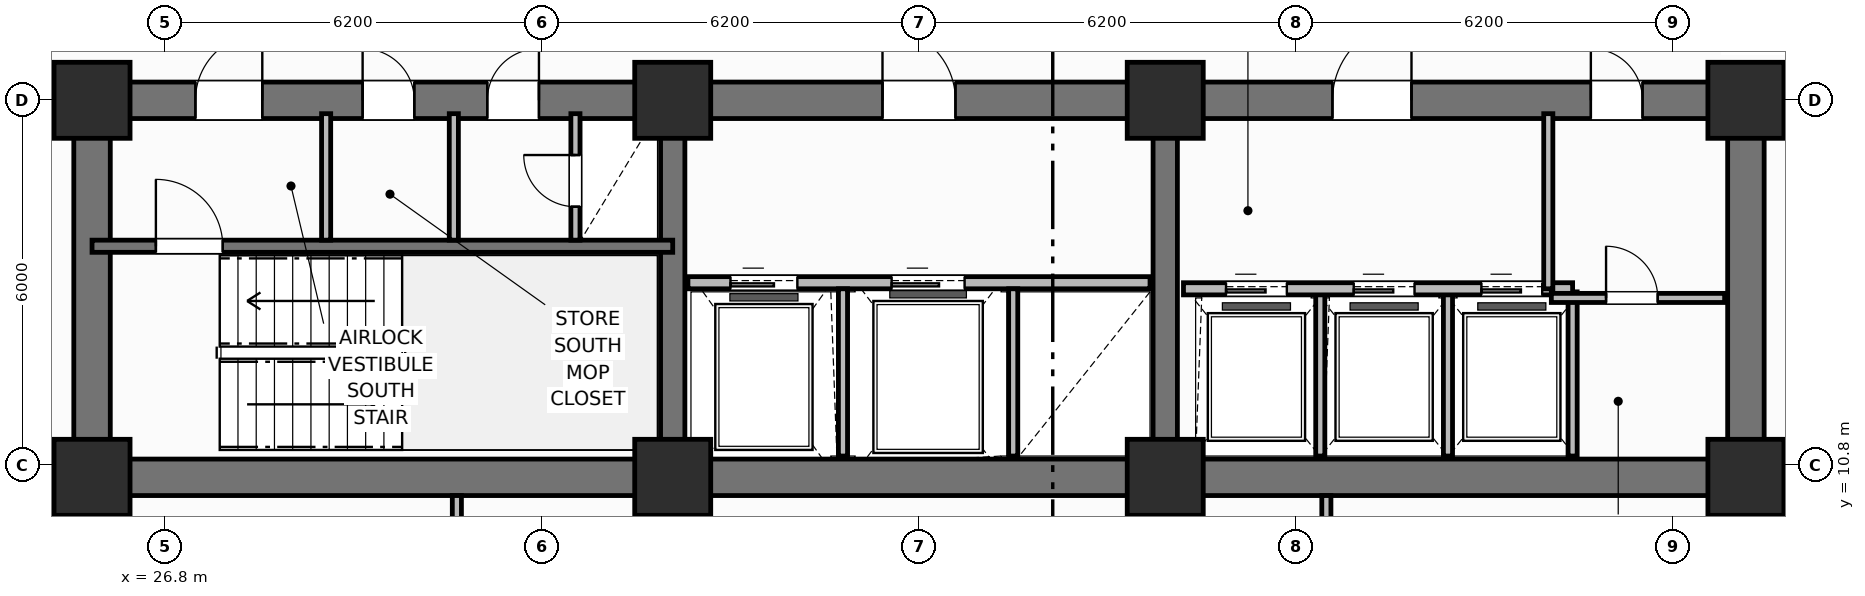
"""IFC4 building model, lengths in metres.
Left out: names, types, materials, properties, quantities, classifications, styles, units other than length and angle.
Written with IfcOpenShell. Run it as: python <this file> out.ifc"""

import sys

from ifc_helpers import new_model, si_unit, direction, frame, frame_2d, origin, origin_2d, place, context, subcontext, project, spatial, rectangle, extrude, element, fill, save


model = new_model("IFC4")
c1 = context("Model", 3, precision=1e-05, world=origin(), true_north=direction((0.0, 1.0)))
c2 = subcontext(c1, "Body", "Model", "MODEL_VIEW")
j1 = project(units=[si_unit("LENGTHUNIT", "METRE"), si_unit("PLANEANGLEUNIT", "RADIAN")], contexts=[c1])
p1 = place(None, origin())
s1 = spatial("IfcSite", under=j1, at=p1, CompositionType="ELEMENT")
p2 = place(p1, origin())
s2 = spatial("IfcBuilding", under=s1, at=p2, CompositionType="ELEMENT")
p3 = place(p2, frame((0.0, 0.0, 73.2)))
s3 = spatial("IfcBuildingStorey", under=s2, at=p3, CompositionType="ELEMENT", Elevation=73.2)
p4 = place(p3, frame((52.8, 10.6, 0.0), z_axis=(0.0, 0.0, 1.0), x_axis=(-1.0, 0.0, 0.0)))
e1 = element("IfcWall", 1, at=p4, inside=s3, PredefinedType="SHEAR", context=c2, shape_type="SweptSolid", body=[
    extrude(rectangle(XDim=27.2, YDim=0.6, at=frame_2d((13.6, 0.0))), origin(), (0.0, 0.0, 1.0), 3.7),
])
for number, where, z_axis, x_axis in (
    (2, (25.6, 10.9, 0.0), (0.0, 0.0, 1.0), (0.0, 1.0, 0.0)),
    (3, (52.8, 10.9, 0.0), (0.0, 0.0, 1.0), (0.0, 1.0, 0.0)),
):
    element("IfcWall", number, at=place(p3, frame(where, z_axis=z_axis, x_axis=x_axis)), inside=s3, PredefinedType="SHEAR", context=c2, shape_type="SweptSolid", body=[
        extrude(rectangle(XDim=5.6, YDim=0.6, at=frame_2d((2.8, 0.0))), origin(), (0.0, 0.0, 1.0), 3.7),
    ])
p5 = place(p3, frame((25.6, 16.8, 0.0), z_axis=(0.0, 0.0, 1.0), x_axis=(1.0, 0.0, 0.0)))
e4 = element("IfcWall", 4, at=p5, inside=s3, PredefinedType="SHEAR", context=c2, shape_type="SweptSolid", body=[
    extrude(rectangle(XDim=27.2, YDim=0.6, at=frame_2d((13.6, 0.0))), origin(), (0.0, 0.0, 1.0), 3.7),
])
p6 = place(p5, frame((1.7, 0.0, 0.0)))
e5 = element("IfcOpeningElement", 5, at=p6, cuts=e4, PredefinedType="OPENING", context=c2, shape_type="SweptSolid", body=[
    extrude(rectangle(XDim=1.1, YDim=2.15, at=frame_2d((0.55, 1.075))), frame((0.0, 0.31, 0.0), z_axis=(0.0, -1.0, 0.0), x_axis=(1.0, 0.0, 0.0)), (0.0, 0.0, 1.0), 0.62),
])
p7 = place(p5, frame((4.45, 0.0, 0.0)))
e6 = element("IfcOpeningElement", 6, at=p7, cuts=e4, PredefinedType="OPENING", context=c2, shape_type="SweptSolid", body=[
    extrude(rectangle(XDim=0.85, YDim=2.1, at=frame_2d((0.425, 1.05))), frame((0.0, 0.31, 0.0), z_axis=(0.0, -1.0, 0.0), x_axis=(1.0, 0.0, 0.0)), (0.0, 0.0, 1.0), 0.62),
])
p8 = place(p5, frame((6.5, 0.0, 0.0)))
e7 = element("IfcOpeningElement", 7, at=p8, cuts=e4, PredefinedType="OPENING", context=c2, shape_type="SweptSolid", body=[
    extrude(rectangle(XDim=0.85, YDim=2.1, at=frame_2d((0.425, 1.05))), frame((0.0, 0.31, 0.0), z_axis=(0.0, -1.0, 0.0), x_axis=(1.0, 0.0, 0.0)), (0.0, 0.0, 1.0), 0.62),
])
p9 = place(p5, frame((13.0, 0.0, 0.0)))
e8 = element("IfcOpeningElement", 8, at=p9, cuts=e4, PredefinedType="OPENING", context=c2, shape_type="SweptSolid", body=[
    extrude(rectangle(XDim=1.2, YDim=2.15, at=frame_2d((0.6, 1.075))), frame((0.0, 0.31, 0.0), z_axis=(0.0, -1.0, 0.0), x_axis=(1.0, 0.0, 0.0)), (0.0, 0.0, 1.0), 0.62),
])
p10 = place(p5, frame((20.4, 0.0, 0.0)))
e9 = element("IfcOpeningElement", 9, at=p10, cuts=e4, PredefinedType="OPENING", context=c2, shape_type="SweptSolid", body=[
    extrude(rectangle(XDim=1.3, YDim=2.2, at=frame_2d((0.65, 1.1))), frame((0.0, 0.31, 0.0), z_axis=(0.0, -1.0, 0.0), x_axis=(1.0, 0.0, 0.0)), (0.0, 0.0, 1.0), 0.62),
])
p11 = place(p5, frame((24.65, 0.0, 0.0)))
e10 = element("IfcOpeningElement", 10, at=p11, cuts=e4, PredefinedType="OPENING", context=c2, shape_type="SweptSolid", body=[
    extrude(rectangle(XDim=0.85, YDim=2.1, at=frame_2d((0.425, 1.05))), frame((0.0, 0.31, 0.0), z_axis=(0.0, -1.0, 0.0), x_axis=(1.0, 0.0, 0.0)), (0.0, 0.0, 1.0), 0.62),
])
for number, where, z_axis, x_axis in (
    (11, (35.15, 10.9, 0.0), (0.0, 0.0, 1.0), (0.0, 1.0, 0.0)),
    (12, (43.25, 10.9, 0.0), (0.0, 0.0, 1.0), (0.0, 1.0, 0.0)),
):
    element("IfcWall", number, at=place(p3, frame(where, z_axis=z_axis, x_axis=x_axis)), inside=s3, PredefinedType="SHEAR", context=c2, shape_type="SweptSolid", body=[
        extrude(rectangle(XDim=5.6, YDim=0.4, at=frame_2d((2.8, 0.0))), origin(), (0.0, 0.0, 1.0), 3.7),
    ])
for number, where, z_axis, x_axis in (
    (13, (25.6, 10.6, 0.0), (0.0, 0.0, 1.0), (1.0, 0.0, 0.0)),
    (14, (25.6, 16.8, 0.0), (0.0, 0.0, 1.0), (1.0, 0.0, 0.0)),
    (15, (35.15, 10.6, 0.0), (0.0, 0.0, 1.0), (1.0, 0.0, 0.0)),
    (16, (35.15, 16.8, 0.0), (0.0, 0.0, 1.0), (1.0, 0.0, 0.0)),
    (17, (43.25, 10.6, 0.0), (0.0, 0.0, 1.0), (1.0, 0.0, 0.0)),
    (18, (43.25, 16.8, 0.0), (0.0, 0.0, 1.0), (1.0, 0.0, 0.0)),
    (19, (52.8, 10.6, 0.0), (0.0, 0.0, 1.0), (1.0, 0.0, 0.0)),
    (20, (52.8, 16.8, 0.0), (0.0, 0.0, 1.0), (1.0, 0.0, 0.0)),
):
    element("IfcColumn", number, at=place(p3, frame(where, z_axis=z_axis, x_axis=x_axis)), inside=s3, PredefinedType="COLUMN", context=c2, shape_type="SweptSolid", body=[
        extrude(rectangle(XDim=1.25, YDim=1.25, at=origin_2d()), origin(), (0.0, 0.0, 1.0), 3.7),
    ])
p12 = place(p3, frame((25.6, 14.4, 0.0), z_axis=(0.0, 0.0, 1.0), x_axis=(1.0, 0.0, 0.0)))
e21 = element("IfcWall", 21, at=p12, inside=s3, PredefinedType="SHEAR", context=c2, shape_type="SweptSolid", body=[
    extrude(rectangle(XDim=9.55, YDim=0.2, at=frame_2d((4.775, 0.0))), origin(), (0.0, 0.0, 1.0), 3.7),
])
p13 = place(p12, frame((1.05, 0.0, 0.0)))
e22 = element("IfcOpeningElement", 22, at=p13, cuts=e21, PredefinedType="OPENING", context=c2, shape_type="SweptSolid", body=[
    extrude(rectangle(XDim=1.1, YDim=2.15, at=frame_2d((0.55, 1.075))), frame((0.0, 0.11, 0.0), z_axis=(0.0, -1.0, 0.0), x_axis=(1.0, 0.0, 0.0)), (0.0, 0.0, 1.0), 0.22),
])
for number, where, z_axis, x_axis in (
    (23, (29.45, 14.5, 0.0), (0.0, 0.0, 1.0), (0.0, 1.0, 0.0)),
    (24, (31.55, 14.5, 0.0), (0.0, 0.0, 1.0), (0.0, 1.0, 0.0)),
):
    element("IfcWall", number, at=place(p3, frame(where, z_axis=z_axis, x_axis=x_axis)), inside=s3, PredefinedType="PARTITIONING", context=c2, shape_type="SweptSolid", body=[
        extrude(rectangle(XDim=2.08, YDim=0.15, at=frame_2d((1.04, 0.0))), origin(), (0.0, 0.0, 1.0), 2.49),
    ])
p14 = place(p3, frame((33.55, 14.5, 0.0), z_axis=(0.0, 0.0, 1.0), x_axis=(0.0, 1.0, 0.0)))
e25 = element("IfcWall", 25, at=p14, inside=s3, PredefinedType="PARTITIONING", context=c2, shape_type="SweptSolid", body=[
    extrude(rectangle(XDim=2.08, YDim=0.15, at=frame_2d((1.04, 0.0))), origin(), (0.0, 0.0, 1.0), 2.49),
])
p15 = place(p14, frame((0.55, 0.0, 0.0)))
e26 = element("IfcOpeningElement", 26, at=p15, cuts=e25, PredefinedType="OPENING", context=c2, shape_type="SweptSolid", body=[
    extrude(rectangle(XDim=0.85, YDim=2.05, at=frame_2d((0.425, 1.025))), frame((0.0, 0.085, 0.0), z_axis=(0.0, -1.0, 0.0), x_axis=(1.0, 0.0, 0.0)), (0.0, 0.0, 1.0), 0.17),
])
p16 = place(p3, frame((35.4, 13.8, 0.0), z_axis=(0.0, 0.0, 1.0), x_axis=(1.0, 0.0, 0.0)))
e27 = element("IfcWall", 27, at=p16, inside=s3, PredefinedType="PARTITIONING", context=c2, shape_type="SweptSolid", body=[
    extrude(rectangle(XDim=7.6, YDim=0.2, at=frame_2d((3.8, 0.0))), origin(), (0.0, 0.0, 1.0), 2.26),
])
p17 = place(p16, frame((0.7, 0.0, 0.0)))
e28 = element("IfcOpeningElement", 28, at=p17, cuts=e27, PredefinedType="OPENING", context=c2, shape_type="SweptSolid", body=[
    extrude(rectangle(XDim=1.1, YDim=2.15, at=frame_2d((0.55, 1.075))), frame((0.0, 0.11, 0.0), z_axis=(0.0, -1.0, 0.0), x_axis=(1.0, 0.0, 0.0)), (0.0, 0.0, 1.0), 0.22),
])
p18 = place(p16, frame((3.35, 0.0, 0.0)))
e29 = element("IfcOpeningElement", 29, at=p18, cuts=e27, PredefinedType="OPENING", context=c2, shape_type="SweptSolid", body=[
    extrude(rectangle(XDim=1.2, YDim=2.15, at=frame_2d((0.6, 1.075))), frame((0.0, 0.11, 0.0), z_axis=(0.0, -1.0, 0.0), x_axis=(1.0, 0.0, 0.0)), (0.0, 0.0, 1.0), 0.22),
])
for number, where, z_axis, x_axis in (
    (30, (37.95, 10.95, 0.0), (0.0, 0.0, 1.0), (0.0, 1.0, 0.0)),
    (31, (40.75, 10.95, 0.0), (0.0, 0.0, 1.0), (0.0, 1.0, 0.0)),
):
    element("IfcWall", number, at=place(p3, frame(where, z_axis=z_axis, x_axis=x_axis)), inside=s3, PredefinedType="PARTITIONING", context=c2, shape_type="SweptSolid", body=[
        extrude(rectangle(XDim=2.75, YDim=0.15, at=frame_2d((1.375, 0.0))), origin(), (0.0, 0.0, 1.0), 2.49),
    ])
for number, where, z_axis, x_axis in (
    (32, (45.8, 10.95, 0.0), (0.0, 0.0, 1.0), (0.0, 1.0, 0.0)),
    (33, (47.9, 10.95, 0.0), (0.0, 0.0, 1.0), (0.0, 1.0, 0.0)),
    (34, (49.95, 10.95, 0.0), (0.0, 0.0, 1.0), (0.0, 1.0, 0.0)),
):
    element("IfcWall", number, at=place(p3, frame(where, z_axis=z_axis, x_axis=x_axis)), inside=s3, PredefinedType="PARTITIONING", context=c2, shape_type="SweptSolid", body=[
        extrude(rectangle(XDim=2.7, YDim=0.15, at=frame_2d((1.35, 0.0))), origin(), (0.0, 0.0, 1.0), 2.49),
    ])
p19 = place(p3, frame((43.55, 13.7, 0.0), z_axis=(0.0, 0.0, 1.0), x_axis=(1.0, 0.0, 0.0)))
e35 = element("IfcWall", 35, at=p19, inside=s3, PredefinedType="PARTITIONING", context=c2, shape_type="SweptSolid", body=[
    extrude(rectangle(XDim=6.4, YDim=0.2, at=frame_2d((3.2, 0.0))), origin(), (0.0, 0.0, 1.0), 2.49),
])
p20 = place(p19, frame((0.7, 0.0, 0.0)))
e36 = element("IfcOpeningElement", 36, at=p20, cuts=e35, PredefinedType="OPENING", context=c2, shape_type="SweptSolid", body=[
    extrude(rectangle(XDim=1.0, YDim=2.15, at=frame_2d((0.5, 1.075))), frame((0.0, 0.11, 0.0), z_axis=(0.0, -1.0, 0.0), x_axis=(1.0, 0.0, 0.0)), (0.0, 0.0, 1.0), 0.22),
])
p21 = place(p19, frame((2.8, 0.0, 0.0)))
e37 = element("IfcOpeningElement", 37, at=p21, cuts=e35, PredefinedType="OPENING", context=c2, shape_type="SweptSolid", body=[
    extrude(rectangle(XDim=1.0, YDim=2.15, at=frame_2d((0.5, 1.075))), frame((0.0, 0.11, 0.0), z_axis=(0.0, -1.0, 0.0), x_axis=(1.0, 0.0, 0.0)), (0.0, 0.0, 1.0), 0.22),
])
p22 = place(p19, frame((4.9, 0.0, 0.0)))
e38 = element("IfcOpeningElement", 38, at=p22, cuts=e35, PredefinedType="OPENING", context=c2, shape_type="SweptSolid", body=[
    extrude(rectangle(XDim=1.0, YDim=2.15, at=frame_2d((0.5, 1.075))), frame((0.0, 0.11, 0.0), z_axis=(0.0, -1.0, 0.0), x_axis=(1.0, 0.0, 0.0)), (0.0, 0.0, 1.0), 0.22),
])
p23 = place(p3, frame((49.55, 13.7, 0.0), z_axis=(0.0, 0.0, 1.0), x_axis=(0.0, 1.0, 0.0)))
e39 = element("IfcWall", 39, at=p23, inside=s3, PredefinedType="PARTITIONING", context=c2, shape_type="SweptSolid", body=[
    extrude(rectangle(XDim=2.88, YDim=0.15, at=frame_2d((1.44, 0.0))), origin(), (0.0, 0.0, 1.0), 2.49),
])
p24 = place(p3, frame((49.6, 13.55, 0.0), z_axis=(0.0, 0.0, 1.0), x_axis=(1.0, 0.0, 0.0)))
e40 = element("IfcWall", 40, at=p24, inside=s3, PredefinedType="PARTITIONING", context=c2, shape_type="SweptSolid", body=[
    extrude(rectangle(XDim=2.85, YDim=0.15, at=frame_2d((1.425, 0.0))), origin(), (0.0, 0.0, 1.0), 2.49),
])
p25 = place(p24, frame((0.9, 0.0, 0.0)))
e41 = element("IfcOpeningElement", 41, at=p25, cuts=e40, PredefinedType="OPENING", context=c2, shape_type="SweptSolid", body=[
    extrude(rectangle(XDim=0.85, YDim=2.1, at=frame_2d((0.425, 1.05))), frame((0.0, 0.085, 0.0), z_axis=(0.0, -1.0, 0.0), x_axis=(1.0, 0.0, 0.0)), (0.0, 0.0, 1.0), 0.17),
])
p26 = place(p3, frame((31.6, 4.97, 0.0), z_axis=(0.0, 0.0, 1.0), x_axis=(0.0, 1.0, 0.0)))
e42 = element("IfcWall", 42, at=p26, inside=s3, PredefinedType="PARTITIONING", context=c2, shape_type="SweptSolid", body=[
    extrude(rectangle(XDim=5.33, YDim=0.15, at=frame_2d((2.665, 0.0))), origin(), (0.0, 0.0, 1.0), 2.49),
])
p27 = place(p26, frame((1.8, 0.0, 0.0)))
e43 = element("IfcOpeningElement", 43, at=p27, cuts=e42, PredefinedType="OPENING", context=c2, shape_type="SweptSolid", body=[
    extrude(rectangle(XDim=0.9, YDim=2.1, at=frame_2d((0.45, 1.05))), frame((0.0, 0.085, 0.0), z_axis=(0.0, -1.0, 0.0), x_axis=(1.0, 0.0, 0.0)), (0.0, 0.0, 1.0), 0.17),
])
p28 = place(p3, frame((45.9, 4.97, 0.0), z_axis=(0.0, 0.0, 1.0), x_axis=(0.0, 1.0, 0.0)))
e44 = element("IfcWall", 44, at=p28, inside=s3, PredefinedType="PARTITIONING", context=c2, shape_type="SweptSolid", body=[
    extrude(rectangle(XDim=5.33, YDim=0.15, at=frame_2d((2.665, 0.0))), origin(), (0.0, 0.0, 1.0), 2.49),
])
p29 = place(p3, frame((25.4, 6.12, 0.0), z_axis=(0.0, 0.0, 1.0), x_axis=(0.0, 1.0, 0.0)))
e45 = element("IfcWall", 45, at=p29, inside=s3, PredefinedType="PARTITIONING", context=c2, shape_type="SweptSolid", body=[
    extrude(rectangle(XDim=4.18, YDim=0.2, at=frame_2d((2.09, 0.0))), origin(), (0.0, 0.0, 1.0), 2.49),
])
p30 = place(p29, frame((0.65, 0.0, 0.0)))
e46 = element("IfcOpeningElement", 46, at=p30, cuts=e45, PredefinedType="OPENING", context=c2, shape_type="SweptSolid", body=[
    extrude(rectangle(XDim=0.9, YDim=2.1, at=frame_2d((0.45, 1.05))), frame((0.0, 0.11, 0.0), z_axis=(0.0, -1.0, 0.0), x_axis=(1.0, 0.0, 0.0)), (0.0, 0.0, 1.0), 0.22),
])
p31 = place(p3, frame((53.0, 6.12, 0.0), z_axis=(0.0, 0.0, 1.0), x_axis=(0.0, 1.0, 0.0)))
e47 = element("IfcWall", 47, at=p31, inside=s3, PredefinedType="PARTITIONING", context=c2, shape_type="SweptSolid", body=[
    extrude(rectangle(XDim=4.18, YDim=0.2, at=frame_2d((2.09, 0.0))), origin(), (0.0, 0.0, 1.0), 2.49),
])
p32 = place(p31, frame((0.65, 0.0, 0.0)))
e48 = element("IfcOpeningElement", 48, at=p32, cuts=e47, PredefinedType="OPENING", context=c2, shape_type="SweptSolid", body=[
    extrude(rectangle(XDim=0.9, YDim=2.1, at=frame_2d((0.45, 1.05))), frame((0.0, 0.11, 0.0), z_axis=(0.0, -1.0, 0.0), x_axis=(1.0, 0.0, 0.0)), (0.0, 0.0, 1.0), 0.22),
])
p33 = place(p13, origin())
e49 = element("IfcDoor", 49, at=p33, inside=s3, OperationType="SINGLE_SWING_LEFT", PredefinedType="DOOR", context=c2, shape_type="SweptSolid", body=[
    extrude(rectangle(XDim=1.1, YDim=2.15, at=frame_2d((0.55, 1.075))), frame((0.0, 0.025, 0.0), z_axis=(0.0, -1.0, 0.0), x_axis=(1.0, 0.0, 0.0)), (0.0, 0.0, 1.0), 0.05),
])
fill(e22, e49)
p34 = place(p15, origin())
e50 = element("IfcDoor", 50, at=p34, inside=s3, OperationType="SINGLE_SWING_RIGHT", PredefinedType="TRAPDOOR", context=c2, shape_type="SweptSolid", body=[
    extrude(rectangle(XDim=0.85, YDim=2.05, at=frame_2d((0.425, 1.025))), frame((0.0, 0.025, 0.0), z_axis=(0.0, -1.0, 0.0), x_axis=(1.0, 0.0, 0.0)), (0.0, 0.0, 1.0), 0.05),
])
fill(e26, e50)
p35 = place(p17, origin())
e51 = element("IfcDoor", 51, at=p35, inside=s3, OperationType="SLIDING_TO_LEFT", PredefinedType="DOOR", context=c2, shape_type="SweptSolid", body=[
    extrude(rectangle(XDim=1.1, YDim=2.15, at=frame_2d((0.55, 1.075))), frame((0.0, 0.025, 0.0), z_axis=(0.0, -1.0, 0.0), x_axis=(1.0, 0.0, 0.0)), (0.0, 0.0, 1.0), 0.05),
])
fill(e28, e51)
p36 = place(p18, origin())
e52 = element("IfcDoor", 52, at=p36, inside=s3, OperationType="SLIDING_TO_LEFT", PredefinedType="DOOR", context=c2, shape_type="SweptSolid", body=[
    extrude(rectangle(XDim=1.2, YDim=2.15, at=frame_2d((0.6, 1.075))), frame((0.0, 0.025, 0.0), z_axis=(0.0, -1.0, 0.0), x_axis=(1.0, 0.0, 0.0)), (0.0, 0.0, 1.0), 0.05),
])
fill(e29, e52)
p37 = place(p20, origin())
e53 = element("IfcDoor", 53, at=p37, inside=s3, OperationType="SLIDING_TO_LEFT", PredefinedType="DOOR", context=c2, shape_type="SweptSolid", body=[
    extrude(rectangle(XDim=1.0, YDim=2.15, at=frame_2d((0.5, 1.075))), frame((0.0, 0.025, 0.0), z_axis=(0.0, -1.0, 0.0), x_axis=(1.0, 0.0, 0.0)), (0.0, 0.0, 1.0), 0.05),
])
fill(e36, e53)
p38 = place(p21, origin())
e54 = element("IfcDoor", 54, at=p38, inside=s3, OperationType="SLIDING_TO_LEFT", PredefinedType="DOOR", context=c2, shape_type="SweptSolid", body=[
    extrude(rectangle(XDim=1.0, YDim=2.15, at=frame_2d((0.5, 1.075))), frame((0.0, 0.025, 0.0), z_axis=(0.0, -1.0, 0.0), x_axis=(1.0, 0.0, 0.0)), (0.0, 0.0, 1.0), 0.05),
])
fill(e37, e54)
p39 = place(p22, origin())
e55 = element("IfcDoor", 55, at=p39, inside=s3, OperationType="SLIDING_TO_LEFT", PredefinedType="DOOR", context=c2, shape_type="SweptSolid", body=[
    extrude(rectangle(XDim=1.0, YDim=2.15, at=frame_2d((0.5, 1.075))), frame((0.0, 0.025, 0.0), z_axis=(0.0, -1.0, 0.0), x_axis=(1.0, 0.0, 0.0)), (0.0, 0.0, 1.0), 0.05),
])
fill(e38, e55)
p40 = place(p25, origin())
e56 = element("IfcDoor", 56, at=p40, inside=s3, OperationType="SINGLE_SWING_LEFT", PredefinedType="DOOR", context=c2, shape_type="SweptSolid", body=[
    extrude(rectangle(XDim=0.85, YDim=2.1, at=frame_2d((0.425, 1.05))), frame((0.0, 0.025, 0.0), z_axis=(0.0, -1.0, 0.0), x_axis=(1.0, 0.0, 0.0)), (0.0, 0.0, 1.0), 0.05),
])
fill(e41, e56)
p41 = place(p6, origin())
e57 = element("IfcDoor", 57, at=p41, inside=s3, OperationType="SINGLE_SWING_RIGHT", PredefinedType="DOOR", context=c2, shape_type="SweptSolid", body=[
    extrude(rectangle(XDim=1.1, YDim=2.15, at=frame_2d((0.55, 1.075))), frame((0.0, 0.025, 0.0), z_axis=(0.0, -1.0, 0.0), x_axis=(1.0, 0.0, 0.0)), (0.0, 0.0, 1.0), 0.05),
])
fill(e5, e57)
p42 = place(p7, origin())
e58 = element("IfcDoor", 58, at=p42, inside=s3, OperationType="SINGLE_SWING_LEFT", PredefinedType="DOOR", context=c2, shape_type="SweptSolid", body=[
    extrude(rectangle(XDim=0.85, YDim=2.1, at=frame_2d((0.425, 1.05))), frame((0.0, 0.025, 0.0), z_axis=(0.0, -1.0, 0.0), x_axis=(1.0, 0.0, 0.0)), (0.0, 0.0, 1.0), 0.05),
])
fill(e6, e58)
p43 = place(p8, origin())
e59 = element("IfcDoor", 59, at=p43, inside=s3, OperationType="SINGLE_SWING_RIGHT", PredefinedType="DOOR", context=c2, shape_type="SweptSolid", body=[
    extrude(rectangle(XDim=0.85, YDim=2.1, at=frame_2d((0.425, 1.05))), frame((0.0, 0.025, 0.0), z_axis=(0.0, -1.0, 0.0), x_axis=(1.0, 0.0, 0.0)), (0.0, 0.0, 1.0), 0.05),
])
fill(e7, e59)
p44 = place(p9, origin())
e60 = element("IfcDoor", 60, at=p44, inside=s3, OperationType="SINGLE_SWING_LEFT", PredefinedType="DOOR", context=c2, shape_type="SweptSolid", body=[
    extrude(rectangle(XDim=1.2, YDim=2.15, at=frame_2d((0.6, 1.075))), frame((0.0, 0.025, 0.0), z_axis=(0.0, -1.0, 0.0), x_axis=(1.0, 0.0, 0.0)), (0.0, 0.0, 1.0), 0.05),
])
fill(e8, e60)
p45 = place(p10, origin())
e61 = element("IfcDoor", 61, at=p45, inside=s3, OperationType="SINGLE_SWING_RIGHT", PredefinedType="DOOR", context=c2, shape_type="SweptSolid", body=[
    extrude(rectangle(XDim=1.3, YDim=2.2, at=frame_2d((0.65, 1.1))), frame((0.0, 0.025, 0.0), z_axis=(0.0, -1.0, 0.0), x_axis=(1.0, 0.0, 0.0)), (0.0, 0.0, 1.0), 0.05),
])
fill(e9, e61)
p46 = place(p11, origin())
e62 = element("IfcDoor", 62, at=p46, inside=s3, OperationType="SINGLE_SWING_LEFT", PredefinedType="DOOR", context=c2, shape_type="SweptSolid", body=[
    extrude(rectangle(XDim=0.85, YDim=2.1, at=frame_2d((0.425, 1.05))), frame((0.0, 0.025, 0.0), z_axis=(0.0, -1.0, 0.0), x_axis=(1.0, 0.0, 0.0)), (0.0, 0.0, 1.0), 0.05),
])
fill(e10, e62)
save(model, sys.argv[1])
